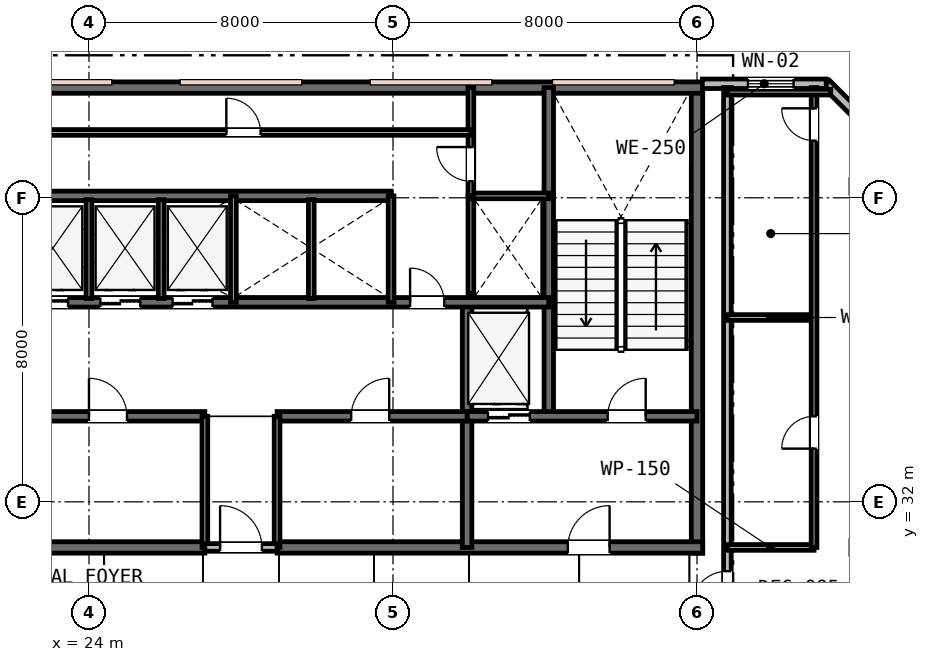
"""IFC4 building model, lengths in metres.
Left out: names, types, materials, properties, quantities, classifications, styles, units other than length and angle.
Written with IfcOpenShell. Run it as: python <this file> out.ifc"""

import sys

from ifc_helpers import new_model, si_unit, direction, frame, frame_2d, origin, place, context, subcontext, project, spatial, rectangle, extrude, element, fill, save


model = new_model("IFC4")
c1 = context("Model", 3, precision=1e-05, world=origin(), true_north=direction((0.0, 1.0)))
c2 = subcontext(c1, "Body", "Model", "MODEL_VIEW")
j1 = project(units=[si_unit("LENGTHUNIT", "METRE"), si_unit("PLANEANGLEUNIT", "RADIAN")], contexts=[c1])
p1 = place(None, origin())
s1 = spatial("IfcSite", under=j1, at=p1, CompositionType="ELEMENT")
p2 = place(p1, origin())
s2 = spatial("IfcBuilding", under=s1, at=p2, CompositionType="ELEMENT")
p3 = place(p2, frame((0.0, 0.0, 271.6)))
s3 = spatial("IfcBuildingStorey", under=s2, at=p3, CompositionType="ELEMENT", Elevation=271.6)
p4 = place(p3, frame((40.0, 30.65, 0.0), z_axis=(0.0, 0.0, 1.0), x_axis=(0.0, 1.0, 0.0)))
e1 = element("IfcWall", 1, at=p4, inside=s3, PredefinedType="SHEAR", context=c2, shape_type="SweptSolid", body=[
    extrude(rectangle(XDim=12.3, YDim=0.3, at=frame_2d((6.15, 0.0))), origin(), (0.0, 0.0, 1.0), 3.8),
])
p5 = place(p3, frame((15.85, 42.9, 0.0), z_axis=(0.0, 0.0, 1.0), x_axis=(1.0, 0.0, 0.0)))
e2 = element("IfcWall", 2, at=p5, inside=s3, PredefinedType="SHEAR", context=c2, shape_type="SweptSolid", body=[
    extrude(rectangle(XDim=24.3, YDim=0.3, at=frame_2d((12.15, 0.0))), origin(), (0.0, 0.0, 1.0), 3.8),
])
p6 = place(p3, frame((15.85, 30.8, 0.0), z_axis=(0.0, 0.0, 1.0), x_axis=(1.0, 0.0, 0.0)))
e3 = element("IfcWall", 3, at=p6, inside=s3, PredefinedType="SHEAR", context=c2, shape_type="SweptSolid", body=[
    extrude(rectangle(XDim=11.2, YDim=0.3, at=frame_2d((5.6, 0.0))), origin(), (0.0, 0.0, 1.0), 3.8),
])
p7 = place(p6, frame((2.45, 0.0, 0.0)))
e4 = element("IfcOpeningElement", 4, at=p7, cuts=e3, PredefinedType="OPENING", context=c2, shape_type="SweptSolid", body=[
    extrude(rectangle(XDim=1.1, YDim=2.15, at=frame_2d((0.55, 1.075))), frame((0.0, 0.16, 0.0), z_axis=(0.0, -1.0, 0.0), x_axis=(1.0, 0.0, 0.0)), (0.0, 0.0, 1.0), 0.32),
])
p8 = place(p3, frame((28.95, 30.8, 0.0), z_axis=(0.0, 0.0, 1.0), x_axis=(1.0, 0.0, 0.0)))
e5 = element("IfcWall", 5, at=p8, inside=s3, PredefinedType="SHEAR", context=c2, shape_type="SweptSolid", body=[
    extrude(rectangle(XDim=11.2, YDim=0.3, at=frame_2d((5.6, 0.0))), origin(), (0.0, 0.0, 1.0), 3.8),
])
p9 = place(p8, frame((7.65, 0.0, 0.0)))
e6 = element("IfcOpeningElement", 6, at=p9, cuts=e5, PredefinedType="OPENING", context=c2, shape_type="SweptSolid", body=[
    extrude(rectangle(XDim=1.1, YDim=2.15, at=frame_2d((0.55, 1.075))), frame((0.0, 0.16, 0.0), z_axis=(0.0, -1.0, 0.0), x_axis=(1.0, 0.0, 0.0)), (0.0, 0.0, 1.0), 0.32),
])
p10 = place(p3, frame((36.1, 34.25, 0.0), z_axis=(0.0, 0.0, 1.0), x_axis=(0.0, 1.0, 0.0)))
e7 = element("IfcWall", 7, at=p10, inside=s3, PredefinedType="SHEAR", context=c2, shape_type="SweptSolid", body=[
    extrude(rectangle(XDim=8.65, YDim=0.25, at=frame_2d((4.325, 0.0))), origin(), (0.0, 0.0, 1.0), 3.8),
])
p11 = place(p3, frame((33.95, 30.8, 0.0), z_axis=(0.0, 0.0, 1.0), x_axis=(0.0, 1.0, 0.0)))
e8 = element("IfcWall", 8, at=p11, inside=s3, PredefinedType="SHEAR", context=c2, shape_type="SweptSolid", body=[
    extrude(rectangle(XDim=6.45, YDim=0.25, at=frame_2d((3.225, 0.0))), origin(), (0.0, 0.0, 1.0), 3.8),
])
p12 = place(p3, frame((33.95, 34.25, 0.0), z_axis=(0.0, 0.0, 1.0), x_axis=(1.0, 0.0, 0.0)))
e9 = element("IfcWall", 9, at=p12, inside=s3, PredefinedType="SHEAR", context=c2, shape_type="SweptSolid", body=[
    extrude(rectangle(XDim=6.05, YDim=0.25, at=frame_2d((3.025, 0.0))), origin(), (0.0, 0.0, 1.0), 3.8),
])
p13 = place(p12, frame((3.7, 0.0, 0.0)))
e10 = element("IfcOpeningElement", 10, at=p13, cuts=e9, PredefinedType="OPENING", context=c2, shape_type="SweptSolid", body=[
    extrude(rectangle(XDim=1.0, YDim=2.15, at=frame_2d((0.5, 1.075))), frame((0.0, 0.135, 0.0), z_axis=(0.0, -1.0, 0.0), x_axis=(1.0, 0.0, 0.0)), (0.0, 0.0, 1.0), 0.27),
])
p14 = place(p12, frame((0.55, 0.0, 0.0)))
e11 = element("IfcOpeningElement", 11, at=p14, cuts=e9, PredefinedType="OPENING", context=c2, shape_type="SweptSolid", body=[
    extrude(rectangle(XDim=1.1, YDim=2.15, at=frame_2d((0.55, 1.075))), frame((0.0, 0.135, 0.0), z_axis=(0.0, -1.0, 0.0), x_axis=(1.0, 0.0, 0.0)), (0.0, 0.0, 1.0), 0.27),
])
p15 = place(p3, frame((22.05, 34.25, 0.0), z_axis=(0.0, 0.0, 1.0), x_axis=(1.0, 0.0, 0.0)))
e12 = element("IfcWall", 12, at=p15, inside=s3, PredefinedType="SHEAR", context=c2, shape_type="SweptSolid", body=[
    extrude(rectangle(XDim=5.0, YDim=0.25, at=frame_2d((2.5, 0.0))), origin(), (0.0, 0.0, 1.0), 3.8),
])
p16 = place(p15, frame((1.95, 0.0, 0.0)))
e13 = element("IfcOpeningElement", 13, at=p16, cuts=e12, PredefinedType="OPENING", context=c2, shape_type="SweptSolid", body=[
    extrude(rectangle(XDim=1.0, YDim=2.15, at=frame_2d((0.5, 1.075))), frame((0.0, 0.135, 0.0), z_axis=(0.0, -1.0, 0.0), x_axis=(1.0, 0.0, 0.0)), (0.0, 0.0, 1.0), 0.27),
])
p17 = place(p3, frame((28.95, 34.25, 0.0), z_axis=(0.0, 0.0, 1.0), x_axis=(1.0, 0.0, 0.0)))
e14 = element("IfcWall", 14, at=p17, inside=s3, PredefinedType="SHEAR", context=c2, shape_type="SweptSolid", body=[
    extrude(rectangle(XDim=5.0, YDim=0.25, at=frame_2d((2.5, 0.0))), origin(), (0.0, 0.0, 1.0), 3.8),
])
p18 = place(p17, frame((1.95, 0.0, 0.0)))
e15 = element("IfcOpeningElement", 15, at=p18, cuts=e14, PredefinedType="OPENING", context=c2, shape_type="SweptSolid", body=[
    extrude(rectangle(XDim=1.0, YDim=2.15, at=frame_2d((0.5, 1.075))), frame((0.0, 0.135, 0.0), z_axis=(0.0, -1.0, 0.0), x_axis=(1.0, 0.0, 0.0)), (0.0, 0.0, 1.0), 0.27),
])
p19 = place(p3, frame((19.9, 37.25, 0.0), z_axis=(0.0, 0.0, 1.0), x_axis=(1.0, 0.0, 0.0)))
e16 = element("IfcWall", 16, at=p19, inside=s3, PredefinedType="SHEAR", context=c2, shape_type="SweptSolid", body=[
    extrude(rectangle(XDim=16.2, YDim=0.25, at=frame_2d((8.1, 0.0))), origin(), (0.0, 0.0, 1.0), 3.8),
])
p20 = place(p19, frame((12.55, 0.0, 0.0)))
e17 = element("IfcOpeningElement", 17, at=p20, cuts=e16, PredefinedType="OPENING", context=c2, shape_type="SweptSolid", body=[
    extrude(rectangle(XDim=0.9, YDim=2.15, at=frame_2d((0.45, 1.075))), frame((0.0, 0.135, 0.0), z_axis=(0.0, -1.0, 0.0), x_axis=(1.0, 0.0, 0.0)), (0.0, 0.0, 1.0), 0.27),
])
p21 = place(p19, frame((2.5, 0.0, 0.0)))
e18 = element("IfcOpeningElement", 18, at=p21, cuts=e16, PredefinedType="OPENING", context=c2, shape_type="SweptSolid", body=[
    extrude(rectangle(XDim=1.05, YDim=2.15, at=frame_2d((0.525, 1.075))), frame((0.0, 0.135, 0.0), z_axis=(0.0, -1.0, 0.0), x_axis=(1.0, 0.0, 0.0)), (0.0, 0.0, 1.0), 0.27),
])
p22 = place(p19, frame((4.4, 0.0, 0.0)))
e19 = element("IfcOpeningElement", 19, at=p22, cuts=e16, PredefinedType="OPENING", context=c2, shape_type="SweptSolid", body=[
    extrude(rectangle(XDim=1.05, YDim=2.15, at=frame_2d((0.525, 1.075))), frame((0.0, 0.135, 0.0), z_axis=(0.0, -1.0, 0.0), x_axis=(1.0, 0.0, 0.0)), (0.0, 0.0, 1.0), 0.27),
])
p23 = place(p19, frame((6.3, 0.0, 0.0)))
e20 = element("IfcOpeningElement", 20, at=p23, cuts=e16, PredefinedType="OPENING", context=c2, shape_type="SweptSolid", body=[
    extrude(rectangle(XDim=1.05, YDim=2.15, at=frame_2d((0.525, 1.075))), frame((0.0, 0.135, 0.0), z_axis=(0.0, -1.0, 0.0), x_axis=(1.0, 0.0, 0.0)), (0.0, 0.0, 1.0), 0.27),
])
p24 = place(p3, frame((19.9, 40.05, 0.0), z_axis=(0.0, 0.0, 1.0), x_axis=(1.0, 0.0, 0.0)))
e21 = element("IfcWall", 21, at=p24, inside=s3, PredefinedType="SHEAR", context=c2, shape_type="SweptSolid", body=[
    extrude(rectangle(XDim=12.05, YDim=0.25, at=frame_2d((6.025, 0.0))), origin(), (0.0, 0.0, 1.0), 3.8),
])
p25 = place(p3, frame((46.0, 40.4, 0.0), z_axis=(0.0, 0.0, 1.0), x_axis=(-0.707106781187, 0.707106781187, 0.0)))
e22 = element("IfcWall", 22, at=p25, inside=s3, PredefinedType="STANDARD", context=c2, shape_type="SweptSolid", body=[
    extrude(rectangle(XDim=3.677, YDim=0.25, at=frame_2d((1.839, 0.0))), origin(), (0.0, 0.0, 1.0), 3.53),
])
p26 = place(p25, frame((1.128, 0.0, 0.85)))
e23 = element("IfcOpeningElement", 23, at=p26, cuts=e22, PredefinedType="OPENING", context=c2, shape_type="SweptSolid", body=[
    extrude(rectangle(XDim=1.2, YDim=1.6, at=frame_2d((0.6, 0.8))), frame((0.0, 0.135, 0.0), z_axis=(0.0, -1.0, 0.0), x_axis=(1.0, 0.0, 0.0)), (0.0, 0.0, 1.0), 0.27),
])
p27 = place(p3, frame((43.4, 43.0, 0.0), z_axis=(0.0, 0.0, 1.0), x_axis=(-1.0, 0.0, 0.0)))
e24 = element("IfcWall", 24, at=p27, inside=s3, PredefinedType="STANDARD", context=c2, shape_type="SweptSolid", body=[
    extrude(rectangle(XDim=3.26, YDim=0.25, at=frame_2d((1.63, 0.0))), origin(), (0.0, 0.0, 1.0), 3.53),
])
p28 = place(p27, frame((0.86, 0.0, 0.85)))
e25 = element("IfcOpeningElement", 25, at=p28, cuts=e24, PredefinedType="OPENING", context=c2, shape_type="SweptSolid", body=[
    extrude(rectangle(XDim=1.2, YDim=1.6, at=frame_2d((0.6, 0.8))), frame((0.0, 0.135, 0.0), z_axis=(0.0, -1.0, 0.0), x_axis=(1.0, 0.0, 0.0)), (0.0, 0.0, 1.0), 0.27),
])
for number, where, z_axis, x_axis in (
    (26, (27.05, 30.8, 0.0), (0.0, 0.0, 1.0), (0.0, 1.0, 0.0)),
    (27, (28.95, 30.8, 0.0), (0.0, 0.0, 1.0), (0.0, 1.0, 0.0)),
):
    element("IfcWall", number, at=place(p3, frame(where, z_axis=z_axis, x_axis=x_axis)), inside=s3, PredefinedType="PLUMBINGWALL", context=c2, shape_type="SweptSolid", body=[
        extrude(rectangle(XDim=3.45, YDim=0.15, at=frame_2d((1.725, 0.0))), origin(), (0.0, 0.0, 1.0), 3.28),
    ])
p29 = place(p3, frame((27.05, 30.8, 0.0), z_axis=(0.0, 0.0, 1.0), x_axis=(1.0, 0.0, 0.0)))
e28 = element("IfcWall", 28, at=p29, inside=s3, PredefinedType="PARTITIONING", context=c2, shape_type="SweptSolid", body=[
    extrude(rectangle(XDim=1.9, YDim=0.2, at=frame_2d((0.95, 0.0))), origin(), (0.0, 0.0, 1.0), 3.28),
])
p30 = place(p29, frame((0.4, 0.0, 0.0)))
e29 = element("IfcOpeningElement", 29, at=p30, cuts=e28, PredefinedType="OPENING", context=c2, shape_type="SweptSolid", body=[
    extrude(rectangle(XDim=1.1, YDim=2.15, at=frame_2d((0.55, 1.075))), frame((0.0, 0.11, 0.0), z_axis=(0.0, -1.0, 0.0), x_axis=(1.0, 0.0, 0.0)), (0.0, 0.0, 1.0), 0.22),
])
p31 = place(p3, frame((27.8, 37.25, 0.0), z_axis=(0.0, 0.0, 1.0), x_axis=(0.0, 1.0, 0.0)))
e30 = element("IfcWall", 30, at=p31, inside=s3, PredefinedType="PLUMBINGWALL", context=c2, shape_type="SweptSolid", body=[
    extrude(rectangle(XDim=2.8, YDim=0.15, at=frame_2d((1.4, 0.0))), origin(), (0.0, 0.0, 1.0), 3.53),
])
for number, where, z_axis, x_axis in (
    (31, (24.0, 37.35, 0.0), (0.0, 0.0, 1.0), (0.0, 1.0, 0.0)),
    (32, (25.9, 37.35, 0.0), (0.0, 0.0, 1.0), (0.0, 1.0, 0.0)),
):
    element("IfcWall", number, at=place(p3, frame(where, z_axis=z_axis, x_axis=x_axis)), inside=s3, PredefinedType="PLUMBINGWALL", context=c2, shape_type="SweptSolid", body=[
        extrude(rectangle(XDim=2.6, YDim=0.15, at=frame_2d((1.3, 0.0))), origin(), (0.0, 0.0, 1.0), 3.53),
    ])
p32 = place(p3, frame((31.95, 37.25, 0.0), z_axis=(0.0, 0.0, 1.0), x_axis=(0.0, 1.0, 0.0)))
e33 = element("IfcWall", 33, at=p32, inside=s3, PredefinedType="PLUMBINGWALL", context=c2, shape_type="SweptSolid", body=[
    extrude(rectangle(XDim=2.8, YDim=0.15, at=frame_2d((1.4, 0.0))), origin(), (0.0, 0.0, 1.0), 3.53),
])
p33 = place(p3, frame((29.85, 37.35, 0.0), z_axis=(0.0, 0.0, 1.0), x_axis=(0.0, 1.0, 0.0)))
e34 = element("IfcWall", 34, at=p33, inside=s3, PredefinedType="PLUMBINGWALL", context=c2, shape_type="SweptSolid", body=[
    extrude(rectangle(XDim=2.6, YDim=0.15, at=frame_2d((1.3, 0.0))), origin(), (0.0, 0.0, 1.0), 3.53),
])
p34 = place(p3, frame((34.05, 37.473, 0.0), z_axis=(0.0, 0.0, 1.0), x_axis=(0.0, 1.0, 0.0)))
e35 = element("IfcWall", 35, at=p34, inside=s3, PredefinedType="PLUMBINGWALL", context=c2, shape_type="SweptSolid", body=[
    extrude(rectangle(XDim=2.577, YDim=0.15, at=frame_2d((1.288, 0.0))), origin(), (0.0, 0.0, 1.0), 3.53),
])
p35 = place(p3, frame((34.05, 40.05, 0.0), z_axis=(0.0, 0.0, 1.0), x_axis=(1.0, 0.0, 0.0)))
e36 = element("IfcWall", 36, at=p35, inside=s3, PredefinedType="PARTITIONING", context=c2, shape_type="SweptSolid", body=[
    extrude(rectangle(XDim=2.05, YDim=0.15, at=frame_2d((1.025, 0.0))), origin(), (0.0, 0.0, 1.0), 3.53),
])
p36 = place(p3, frame((34.05, 40.05, 0.0), z_axis=(0.0, 0.0, 1.0), x_axis=(0.0, 1.0, 0.0)))
e37 = element("IfcWall", 37, at=p36, inside=s3, PredefinedType="PARTITIONING", context=c2, shape_type="SweptSolid", body=[
    extrude(rectangle(XDim=2.85, YDim=0.15, at=frame_2d((1.425, 0.0))), origin(), (0.0, 0.0, 1.0), 3.53),
])
p37 = place(p36, frame((0.385, 0.0, 0.0)))
e38 = element("IfcOpeningElement", 38, at=p37, cuts=e37, PredefinedType="OPENING", context=c2, shape_type="SweptSolid", body=[
    extrude(rectangle(XDim=0.9, YDim=2.15, at=frame_2d((0.45, 1.075))), frame((0.0, 0.085, 0.0), z_axis=(0.0, -1.0, 0.0), x_axis=(1.0, 0.0, 0.0)), (0.0, 0.0, 1.0), 0.17),
])
p38 = place(p3, frame((22.08, 41.72, 0.0), z_axis=(0.0, 0.0, 1.0), x_axis=(1.0, 0.0, 0.0)))
e39 = element("IfcWall", 39, at=p38, inside=s3, PredefinedType="PARTITIONING", context=c2, shape_type="SweptSolid", body=[
    extrude(rectangle(XDim=11.97, YDim=0.15, at=frame_2d((5.985, 0.0))), origin(), (0.0, 0.0, 1.0), 3.53),
])
p39 = place(p38, frame((5.535, 0.0, 0.0)))
e40 = element("IfcOpeningElement", 40, at=p39, cuts=e39, PredefinedType="OPENING", context=c2, shape_type="SweptSolid", body=[
    extrude(rectangle(XDim=0.9, YDim=2.15, at=frame_2d((0.45, 1.075))), frame((0.0, 0.085, 0.0), z_axis=(0.0, -1.0, 0.0), x_axis=(1.0, 0.0, 0.0)), (0.0, 0.0, 1.0), 0.17),
])
p40 = place(p3, frame((40.8, 28.6, 0.0), z_axis=(0.0, 0.0, 1.0), x_axis=(0.0, 1.0, 0.0)))
e41 = element("IfcWall", 41, at=p40, inside=s3, PredefinedType="PARTITIONING", context=c2, shape_type="SweptSolid", body=[
    extrude(rectangle(XDim=14.3, YDim=0.2, at=frame_2d((7.15, 0.0))), origin(), (0.0, 0.0, 1.0), 3.16),
])
p41 = place(p40, frame((0.625, 0.0, 0.0)))
e42 = element("IfcOpeningElement", 42, at=p41, cuts=e41, PredefinedType="OPENING", context=c2, shape_type="SweptSolid", body=[
    extrude(rectangle(XDim=0.95, YDim=2.15, at=frame_2d((0.475, 1.075))), frame((0.0, 0.11, 0.0), z_axis=(0.0, -1.0, 0.0), x_axis=(1.0, 0.0, 0.0)), (0.0, 0.0, 1.0), 0.22),
])
p42 = place(p3, frame((40.8, 30.8, 0.0), z_axis=(0.0, 0.0, 1.0), x_axis=(1.0, 0.0, 0.0)))
e43 = element("IfcWall", 43, at=p42, inside=s3, PredefinedType="PARTITIONING", context=c2, shape_type="SweptSolid", body=[
    extrude(rectangle(XDim=2.28, YDim=0.15, at=frame_2d((1.14, 0.0))), origin(), (0.0, 0.0, 1.0), 3.16),
])
p43 = place(p3, frame((40.8, 36.85, 0.0), z_axis=(0.0, 0.0, 1.0), x_axis=(1.0, 0.0, 0.0)))
e44 = element("IfcWall", 44, at=p43, inside=s3, PredefinedType="PARTITIONING", context=c2, shape_type="SweptSolid", body=[
    extrude(rectangle(XDim=2.28, YDim=0.15, at=frame_2d((1.14, 0.0))), origin(), (0.0, 0.0, 1.0), 3.53),
])
p44 = place(p3, frame((43.08, 30.8, 0.0), z_axis=(0.0, 0.0, 1.0), x_axis=(0.0, 1.0, 0.0)))
e45 = element("IfcWall", 45, at=p44, inside=s3, PredefinedType="PARTITIONING", context=c2, shape_type="SweptSolid", body=[
    extrude(rectangle(XDim=12.1, YDim=0.15, at=frame_2d((6.05, 0.0))), origin(), (0.0, 0.0, 1.0), 3.16),
])
p45 = place(p44, frame((2.6, 0.0, 0.0)))
e46 = element("IfcOpeningElement", 46, at=p45, cuts=e45, PredefinedType="OPENING", context=c2, shape_type="SweptSolid", body=[
    extrude(rectangle(XDim=0.85, YDim=2.15, at=frame_2d((0.425, 1.075))), frame((0.0, 0.085, 0.0), z_axis=(0.0, -1.0, 0.0), x_axis=(1.0, 0.0, 0.0)), (0.0, 0.0, 1.0), 0.17),
])
p46 = place(p44, frame((10.704, 0.0, 0.0)))
e47 = element("IfcOpeningElement", 47, at=p46, cuts=e45, PredefinedType="OPENING", context=c2, shape_type="SweptSolid", body=[
    extrude(rectangle(XDim=0.85, YDim=2.15, at=frame_2d((0.425, 1.075))), frame((0.0, 0.085, 0.0), z_axis=(0.0, -1.0, 0.0), x_axis=(1.0, 0.0, 0.0)), (0.0, 0.0, 1.0), 0.17),
])
p47 = place(p3, frame((40.8, 42.78, 0.0), z_axis=(0.0, 0.0, 1.0), x_axis=(1.0, 0.0, 0.0)))
e48 = element("IfcWall", 48, at=p47, inside=s3, PredefinedType="PARTITIONING", context=c2, shape_type="SweptSolid", body=[
    extrude(rectangle(XDim=2.72, YDim=0.15, at=frame_2d((1.36, 0.0))), origin(), (0.0, 0.0, 1.0), 3.53),
])
p48 = place(p28, origin())
e49 = element("IfcWindow", 49, at=p48, inside=s3, PartitioningType="SINGLE_PANEL", PredefinedType="WINDOW", context=c2, shape_type="SweptSolid", body=[
    extrude(rectangle(XDim=1.2, YDim=1.6, at=frame_2d((0.6, 0.8))), frame((0.0, 0.03, 0.0), z_axis=(0.0, -1.0, 0.0), x_axis=(1.0, 0.0, 0.0)), (0.0, 0.0, 1.0), 0.06),
])
fill(e25, e49)
p49 = place(p30, origin())
e50 = element("IfcDoor", 50, at=p49, inside=s3, OperationType="SINGLE_SWING_LEFT", PredefinedType="DOOR", context=c2, shape_type="SweptSolid", body=[
    extrude(rectangle(XDim=1.1, YDim=2.15, at=frame_2d((0.55, 1.075))), frame((0.0, 0.025, 0.0), z_axis=(0.0, -1.0, 0.0), x_axis=(1.0, 0.0, 0.0)), (0.0, 0.0, 1.0), 0.05),
])
fill(e29, e50)
p50 = place(p13, origin())
e51 = element("IfcDoor", 51, at=p50, inside=s3, OperationType="SINGLE_SWING_RIGHT", PredefinedType="DOOR", context=c2, shape_type="SweptSolid", body=[
    extrude(rectangle(XDim=1.0, YDim=2.15, at=frame_2d((0.5, 1.075))), frame((0.0, 0.025, 0.0), z_axis=(0.0, -1.0, 0.0), x_axis=(1.0, 0.0, 0.0)), (0.0, 0.0, 1.0), 0.05),
])
fill(e10, e51)
p51 = place(p9, origin())
e52 = element("IfcDoor", 52, at=p51, inside=s3, OperationType="SINGLE_SWING_RIGHT", PredefinedType="DOOR", context=c2, shape_type="SweptSolid", body=[
    extrude(rectangle(XDim=1.1, YDim=2.15, at=frame_2d((0.55, 1.075))), frame((0.0, 0.025, 0.0), z_axis=(0.0, -1.0, 0.0), x_axis=(1.0, 0.0, 0.0)), (0.0, 0.0, 1.0), 0.05),
])
fill(e6, e52)
p52 = place(p16, origin())
e53 = element("IfcDoor", 53, at=p52, inside=s3, OperationType="SINGLE_SWING_LEFT", PredefinedType="DOOR", context=c2, shape_type="SweptSolid", body=[
    extrude(rectangle(XDim=1.0, YDim=2.15, at=frame_2d((0.5, 1.075))), frame((0.0, 0.025, 0.0), z_axis=(0.0, -1.0, 0.0), x_axis=(1.0, 0.0, 0.0)), (0.0, 0.0, 1.0), 0.05),
])
fill(e13, e53)
p53 = place(p18, origin())
e54 = element("IfcDoor", 54, at=p53, inside=s3, OperationType="SINGLE_SWING_RIGHT", PredefinedType="DOOR", context=c2, shape_type="SweptSolid", body=[
    extrude(rectangle(XDim=1.0, YDim=2.15, at=frame_2d((0.5, 1.075))), frame((0.0, 0.025, 0.0), z_axis=(0.0, -1.0, 0.0), x_axis=(1.0, 0.0, 0.0)), (0.0, 0.0, 1.0), 0.05),
])
fill(e15, e54)
p54 = place(p20, origin())
e55 = element("IfcDoor", 55, at=p54, inside=s3, OperationType="SINGLE_SWING_LEFT", PredefinedType="DOOR", context=c2, shape_type="SweptSolid", body=[
    extrude(rectangle(XDim=0.9, YDim=2.15, at=frame_2d((0.45, 1.075))), frame((0.0, 0.025, 0.0), z_axis=(0.0, -1.0, 0.0), x_axis=(1.0, 0.0, 0.0)), (0.0, 0.0, 1.0), 0.05),
])
fill(e17, e55)
p55 = place(p37, origin())
e56 = element("IfcDoor", 56, at=p55, inside=s3, OperationType="SINGLE_SWING_RIGHT", PredefinedType="DOOR", context=c2, shape_type="SweptSolid", body=[
    extrude(rectangle(XDim=0.9, YDim=2.15, at=frame_2d((0.45, 1.075))), frame((0.0, 0.025, 0.0), z_axis=(0.0, -1.0, 0.0), x_axis=(1.0, 0.0, 0.0)), (0.0, 0.0, 1.0), 0.05),
])
fill(e38, e56)
p56 = place(p39, origin())
e57 = element("IfcDoor", 57, at=p56, inside=s3, OperationType="SINGLE_SWING_LEFT", PredefinedType="DOOR", context=c2, shape_type="SweptSolid", body=[
    extrude(rectangle(XDim=0.9, YDim=2.15, at=frame_2d((0.45, 1.075))), frame((0.0, 0.025, 0.0), z_axis=(0.0, -1.0, 0.0), x_axis=(1.0, 0.0, 0.0)), (0.0, 0.0, 1.0), 0.05),
])
fill(e40, e57)
p57 = place(p41, origin())
e58 = element("IfcDoor", 58, at=p57, inside=s3, OperationType="SINGLE_SWING_LEFT", PredefinedType="DOOR", context=c2, shape_type="SweptSolid", body=[
    extrude(rectangle(XDim=0.95, YDim=2.15, at=frame_2d((0.475, 1.075))), frame((0.0, 0.025, 0.0), z_axis=(0.0, -1.0, 0.0), x_axis=(1.0, 0.0, 0.0)), (0.0, 0.0, 1.0), 0.05),
])
fill(e42, e58)
p58 = place(p45, origin())
e59 = element("IfcDoor", 59, at=p58, inside=s3, OperationType="SINGLE_SWING_LEFT", PredefinedType="DOOR", context=c2, shape_type="SweptSolid", body=[
    extrude(rectangle(XDim=0.85, YDim=2.15, at=frame_2d((0.425, 1.075))), frame((0.0, 0.025, 0.0), z_axis=(0.0, -1.0, 0.0), x_axis=(1.0, 0.0, 0.0)), (0.0, 0.0, 1.0), 0.05),
])
fill(e46, e59)
p59 = place(p46, origin())
e60 = element("IfcDoor", 60, at=p59, inside=s3, OperationType="SINGLE_SWING_RIGHT", PredefinedType="DOOR", context=c2, shape_type="SweptSolid", body=[
    extrude(rectangle(XDim=0.85, YDim=2.15, at=frame_2d((0.425, 1.075))), frame((0.0, 0.025, 0.0), z_axis=(0.0, -1.0, 0.0), x_axis=(1.0, 0.0, 0.0)), (0.0, 0.0, 1.0), 0.05),
])
fill(e47, e60)
p60 = place(p14, origin())
e61 = element("IfcDoor", 61, at=p60, inside=s3, OperationType="DOUBLE_DOOR_SLIDING", PredefinedType="DOOR", context=c2, shape_type="SweptSolid", body=[
    extrude(rectangle(XDim=1.1, YDim=2.15, at=frame_2d((0.55, 1.075))), frame((0.0, 0.025, 0.0), z_axis=(0.0, -1.0, 0.0), x_axis=(1.0, 0.0, 0.0)), (0.0, 0.0, 1.0), 0.05),
])
fill(e11, e61)
p61 = place(p21, origin())
e62 = element("IfcDoor", 62, at=p61, inside=s3, OperationType="DOUBLE_DOOR_SLIDING", PredefinedType="DOOR", context=c2, shape_type="SweptSolid", body=[
    extrude(rectangle(XDim=1.05, YDim=2.15, at=frame_2d((0.525, 1.075))), frame((0.0, 0.025, 0.0), z_axis=(0.0, -1.0, 0.0), x_axis=(1.0, 0.0, 0.0)), (0.0, 0.0, 1.0), 0.05),
])
fill(e18, e62)
p62 = place(p22, origin())
e63 = element("IfcDoor", 63, at=p62, inside=s3, OperationType="DOUBLE_DOOR_SLIDING", PredefinedType="DOOR", context=c2, shape_type="SweptSolid", body=[
    extrude(rectangle(XDim=1.05, YDim=2.15, at=frame_2d((0.525, 1.075))), frame((0.0, 0.025, 0.0), z_axis=(0.0, -1.0, 0.0), x_axis=(1.0, 0.0, 0.0)), (0.0, 0.0, 1.0), 0.05),
])
fill(e19, e63)
p63 = place(p23, origin())
e64 = element("IfcDoor", 64, at=p63, inside=s3, OperationType="DOUBLE_DOOR_SLIDING", PredefinedType="DOOR", context=c2, shape_type="SweptSolid", body=[
    extrude(rectangle(XDim=1.05, YDim=2.15, at=frame_2d((0.525, 1.075))), frame((0.0, 0.025, 0.0), z_axis=(0.0, -1.0, 0.0), x_axis=(1.0, 0.0, 0.0)), (0.0, 0.0, 1.0), 0.05),
])
fill(e20, e64)
save(model, sys.argv[1])
